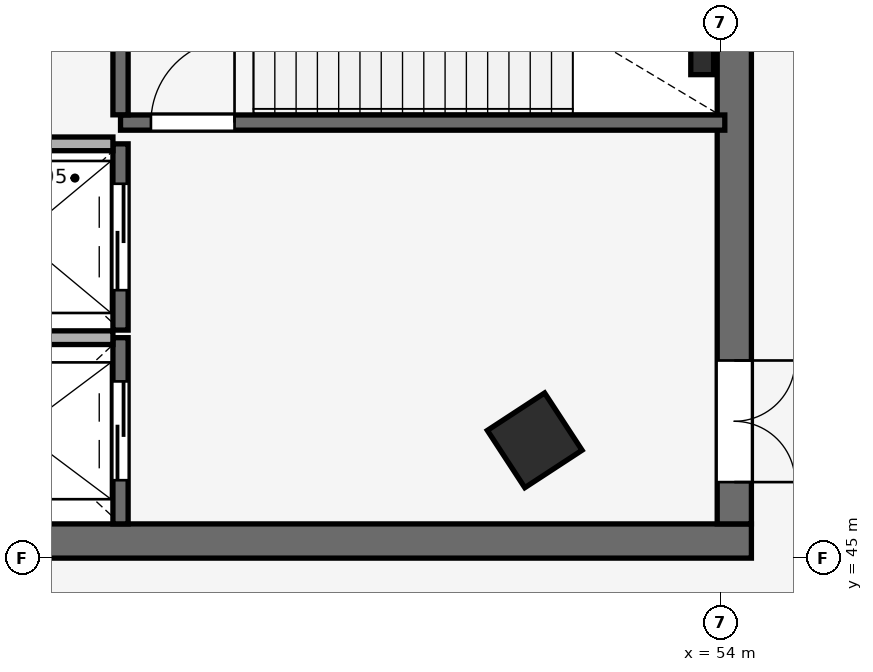
"""IFC4 building model, lengths in metres.
Left out: names, types, materials, properties, quantities, classifications, styles, units other than length and angle.
Written with IfcOpenShell. Run it as: python <this file> out.ifc"""

import sys

from ifc_helpers import new_model, si_unit, direction, frame, frame_2d, origin, origin_2d, place, context, subcontext, project, spatial, rectangle, i_section, extrude, element, fill, save


model = new_model("IFC4")
c1 = context("Model", 3, precision=1e-05, world=origin(), true_north=direction((0.0, 1.0)))
c2 = subcontext(c1, "Body", "Model", "MODEL_VIEW")
j1 = project(units=[si_unit("LENGTHUNIT", "METRE"), si_unit("PLANEANGLEUNIT", "RADIAN")], contexts=[c1])
p1 = place(None, origin())
s1 = spatial("IfcSite", under=j1, at=p1, CompositionType="ELEMENT")
p2 = place(p1, origin())
s2 = spatial("IfcBuilding", under=s1, at=p2, CompositionType="ELEMENT")
p3 = place(p2, origin())
s3 = spatial("IfcBuildingStorey", under=s2, at=p3, CompositionType="ELEMENT", Elevation=0.0)
p4 = place(p3, frame((51.549, 46.55, 0.0), z_axis=(0.0, 0.0, 1.0), x_axis=(-0.836955398099, -0.547271104292, 0.0)))
e1 = element("IfcColumn", 1, at=p4, inside=s3, PredefinedType="COLUMN", context=c2, shape_type="SweptSolid", body=[
    extrude(rectangle(XDim=0.9, YDim=0.9, at=origin_2d()), origin(), (0.0, 0.0, 1.0), 5.4),
])
p5 = place(p3, frame((43.0, 45.225, 0.0), z_axis=(0.0, 0.0, 1.0), x_axis=(1.0, 0.0, 0.0)))
e2 = element("IfcWall", 2, at=p5, inside=s3, PredefinedType="SHEAR", context=c2, shape_type="SweptSolid", body=[
    extrude(rectangle(XDim=11.4, YDim=0.45, at=frame_2d((5.7, 0.0))), origin(), (0.0, 0.0, 1.0), 5.4),
])
p6 = place(p3, frame((54.175, 45.45, 0.0), z_axis=(0.0, 0.0, 1.0), x_axis=(0.0, 1.0, 0.0)))
e3 = element("IfcWall", 3, at=p6, inside=s3, PredefinedType="SHEAR", context=c2, shape_type="SweptSolid", body=[
    extrude(rectangle(XDim=9.1, YDim=0.45, at=frame_2d((4.55, 0.0))), origin(), (0.0, 0.0, 1.0), 5.4),
])
p7 = place(p6, frame((0.55, 0.0, 0.0)))
e4 = element("IfcOpeningElement", 4, at=p7, cuts=e3, PredefinedType="OPENING", context=c2, shape_type="SweptSolid", body=[
    extrude(rectangle(XDim=1.6, YDim=2.2, at=frame_2d((0.8, 1.1))), frame((0.0, 0.235, 0.0), z_axis=(0.0, -1.0, 0.0), x_axis=(1.0, 0.0, 0.0)), (0.0, 0.0, 1.0), 0.47),
])
p8 = place(p3, frame((53.752, 51.611, 0.0), z_axis=(0.0, 0.0, 1.0), x_axis=(1.0, 0.0, 0.0)))
e5 = element("IfcColumn", 5, at=p8, inside=s3, PredefinedType="COLUMN", context=c2, shape_type="SweptSolid", body=[
    extrude(i_section(OverallWidth=0.3, OverallDepth=0.5, WebThickness=0.014, FlangeThickness=0.028, FilletRadius=0.027, at=origin_2d()), origin(), (0.0, 0.0, 1.0), 5.4),
])
p9 = place(p3, frame((46.1, 45.45, 0.0), z_axis=(0.0, 0.0, 1.0), x_axis=(0.0, 1.0, 0.0)))
e6 = element("IfcWall", 6, at=p9, inside=s3, PredefinedType="SHEAR", context=c2, shape_type="SweptSolid", body=[
    extrude(rectangle(XDim=2.45, YDim=0.2, at=frame_2d((1.225, 0.0))), origin(), (0.0, 0.0, 1.0), 5.12),
])
p10 = place(p9, frame((0.575, 0.0, 0.0)))
e7 = element("IfcOpeningElement", 7, at=p10, cuts=e6, PredefinedType="OPENING", context=c2, shape_type="SweptSolid", body=[
    extrude(rectangle(XDim=1.3, YDim=2.2, at=frame_2d((0.65, 1.1))), frame((0.0, 0.11, 0.0), z_axis=(0.0, -1.0, 0.0), x_axis=(1.0, 0.0, 0.0)), (0.0, 0.0, 1.0), 0.22),
])
p11 = place(p3, frame((43.55, 47.9, 0.0), z_axis=(0.0, 0.0, 1.0), x_axis=(1.0, 0.0, 0.0)))
e8 = element("IfcWall", 8, at=p11, inside=s3, PredefinedType="PARTITIONING", context=c2, shape_type="SweptSolid", body=[
    extrude(rectangle(XDim=2.45, YDim=0.18, at=frame_2d((1.225, 0.0))), origin(), (0.0, 0.0, 1.0), 5.4),
])
p12 = place(p3, frame((46.1, 48.0, 0.0), z_axis=(0.0, 0.0, 1.0), x_axis=(0.0, 1.0, 0.0)))
e9 = element("IfcWall", 9, at=p12, inside=s3, PredefinedType="SHEAR", context=c2, shape_type="SweptSolid", body=[
    extrude(rectangle(XDim=2.45, YDim=0.2, at=frame_2d((1.225, 0.0))), origin(), (0.0, 0.0, 1.0), 5.12),
])
p13 = place(p12, frame((0.525, 0.0, 0.0)))
e10 = element("IfcOpeningElement", 10, at=p13, cuts=e9, PredefinedType="OPENING", context=c2, shape_type="SweptSolid", body=[
    extrude(rectangle(XDim=1.4, YDim=2.2, at=frame_2d((0.7, 1.1))), frame((0.0, 0.11, 0.0), z_axis=(0.0, -1.0, 0.0), x_axis=(1.0, 0.0, 0.0)), (0.0, 0.0, 1.0), 0.22),
])
p14 = place(p3, frame((43.55, 50.45, 0.0), z_axis=(0.0, 0.0, 1.0), x_axis=(1.0, 0.0, 0.0)))
e11 = element("IfcWall", 11, at=p14, inside=s3, PredefinedType="PARTITIONING", context=c2, shape_type="SweptSolid", body=[
    extrude(rectangle(XDim=2.45, YDim=0.18, at=frame_2d((1.225, 0.0))), origin(), (0.0, 0.0, 1.0), 5.4),
])
p15 = place(p3, frame((46.1, 50.73, 0.0), z_axis=(0.0, 0.0, 1.0), x_axis=(1.0, 0.0, 0.0)))
e12 = element("IfcWall", 12, at=p15, inside=s3, PredefinedType="SHEAR", context=c2, shape_type="SweptSolid", body=[
    extrude(rectangle(XDim=7.95, YDim=0.2, at=frame_2d((3.975, 0.0))), origin(), (0.0, 0.0, 1.0), 5.4),
])
p16 = place(p15, frame((0.4, 0.0, 0.0)))
e13 = element("IfcOpeningElement", 13, at=p16, cuts=e12, PredefinedType="OPENING", context=c2, shape_type="SweptSolid", body=[
    extrude(rectangle(XDim=1.1, YDim=2.15, at=frame_2d((0.55, 1.075))), frame((0.0, 0.11, 0.0), z_axis=(0.0, -1.0, 0.0), x_axis=(1.0, 0.0, 0.0)), (0.0, 0.0, 1.0), 0.22),
])
p17 = place(p3, frame((46.1, 50.832, 0.0), z_axis=(0.0, 0.0, 1.0), x_axis=(0.0, 1.0, 0.0)))
e14 = element("IfcWall", 14, at=p17, inside=s3, PredefinedType="SHEAR", context=c2, shape_type="SweptSolid", body=[
    extrude(rectangle(XDim=3.686, YDim=0.2, at=frame_2d((1.843, 0.0))), origin(), (0.0, 0.0, 1.0), 5.4),
])
p18 = place(p10, origin())
e15 = element("IfcDoor", 15, at=p18, inside=s3, OperationType="DOUBLE_DOOR_SLIDING", PredefinedType="DOOR", context=c2, shape_type="SweptSolid", body=[
    extrude(rectangle(XDim=1.3, YDim=2.2, at=frame_2d((0.65, 1.1))), frame((0.0, 0.025, 0.0), z_axis=(0.0, -1.0, 0.0), x_axis=(1.0, 0.0, 0.0)), (0.0, 0.0, 1.0), 0.05),
])
fill(e7, e15)
p19 = place(p13, origin())
e16 = element("IfcDoor", 16, at=p19, inside=s3, OperationType="DOUBLE_DOOR_SLIDING", PredefinedType="DOOR", context=c2, shape_type="SweptSolid", body=[
    extrude(rectangle(XDim=1.4, YDim=2.2, at=frame_2d((0.7, 1.1))), frame((0.0, 0.025, 0.0), z_axis=(0.0, -1.0, 0.0), x_axis=(1.0, 0.0, 0.0)), (0.0, 0.0, 1.0), 0.05),
])
fill(e10, e16)
p20 = place(p16, frame((1.1, 0.0, 0.0), z_axis=(0.0, 0.0, 1.0), x_axis=(-1.0, 0.0, 0.0)))
e17 = element("IfcDoor", 17, at=p20, inside=s3, OperationType="SINGLE_SWING_LEFT", PredefinedType="DOOR", context=c2, shape_type="SweptSolid", body=[
    extrude(rectangle(XDim=1.1, YDim=2.15, at=frame_2d((0.55, 1.075))), frame((0.0, 0.025, 0.0), z_axis=(0.0, -1.0, 0.0), x_axis=(1.0, 0.0, 0.0)), (0.0, 0.0, 1.0), 0.05),
])
fill(e13, e17)
p21 = place(p7, frame((1.6, 0.0, 0.0), z_axis=(0.0, 0.0, 1.0), x_axis=(-1.0, 0.0, 0.0)))
e18 = element("IfcDoor", 18, at=p21, inside=s3, OperationType="DOUBLE_DOOR_SINGLE_SWING", PredefinedType="DOOR", context=c2, shape_type="SweptSolid", body=[
    extrude(rectangle(XDim=1.6, YDim=2.2, at=frame_2d((0.8, 1.1))), frame((0.0, 0.025, 0.0), z_axis=(0.0, -1.0, 0.0), x_axis=(1.0, 0.0, 0.0)), (0.0, 0.0, 1.0), 0.05),
])
fill(e4, e18)
save(model, sys.argv[1])
